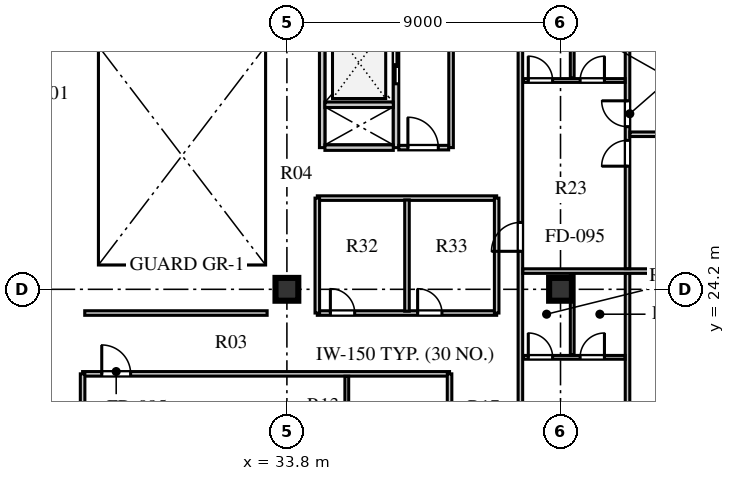
"""IFC4 building model, lengths in metres.
Left out: names, types, materials, properties, quantities, classifications, styles, units other than length and angle.
Written with IfcOpenShell. Run it as: python <this file> out.ifc"""

import sys

from ifc_helpers import new_model, si_unit, direction, frame, frame_2d, origin, origin_2d, place, context, subcontext, project, spatial, rectangle, extrude, element, fill, save


model = new_model("IFC4")
c1 = context("Model", 3, precision=1e-05, world=origin(), true_north=direction((0.0, 1.0)))
c2 = subcontext(c1, "Body", "Model", "MODEL_VIEW")
j1 = project(units=[si_unit("LENGTHUNIT", "METRE"), si_unit("PLANEANGLEUNIT", "RADIAN")], contexts=[c1])
p1 = place(None, origin())
s1 = spatial("IfcSite", under=j1, at=p1, CompositionType="ELEMENT")
p2 = place(p1, origin())
s2 = spatial("IfcBuilding", under=s1, at=p2, CompositionType="ELEMENT")
p3 = place(p2, frame((0.0, 0.0, 312.5)))
s3 = spatial("IfcBuildingStorey", under=s2, at=p3, CompositionType="ELEMENT", Elevation=312.5)
for number, where, z_axis, x_axis in (
    (1, (33.8, 24.2, 0.0), (0.0, 0.0, 1.0), (1.0, 0.0, 0.0)),
    (2, (42.8, 24.2, 0.0), (0.0, 0.0, 1.0), (1.0, 0.0, 0.0)),
):
    element("IfcColumn", number, at=place(p3, frame(where, z_axis=z_axis, x_axis=x_axis)), inside=s3, PredefinedType="COLUMN", context=c2, shape_type="SweptSolid", body=[
        extrude(rectangle(XDim=0.75, YDim=0.75, at=origin_2d()), origin(), (0.0, 0.0, 1.0), 3.56),
    ])
p4 = place(p3, frame((34.96, 28.86, 0.0), z_axis=(0.0, 0.0, 1.0), x_axis=(0.0, 1.0, 0.0)))
e3 = element("IfcWall", 3, at=p4, inside=s3, PredefinedType="SOLIDWALL", context=c2, shape_type="SweptSolid", body=[
    extrude(rectangle(XDim=4.22, YDim=0.18, at=frame_2d((2.11, 0.0))), origin(), (0.0, 0.0, 1.0), 3.56),
])
p5 = place(p3, frame((37.39, 28.86, 0.0), z_axis=(0.0, 0.0, 1.0), x_axis=(0.0, 1.0, 0.0)))
e4 = element("IfcWall", 4, at=p5, inside=s3, PredefinedType="SOLIDWALL", context=c2, shape_type="SweptSolid", body=[
    extrude(rectangle(XDim=4.22, YDim=0.18, at=frame_2d((2.11, 0.0))), origin(), (0.0, 0.0, 1.0), 3.56),
])
p6 = place(p5, frame((2.1, 0.0, 0.0)))
e5 = element("IfcOpeningElement", 5, at=p6, cuts=e4, PredefinedType="OPENING", context=c2, shape_type="SweptSolid", body=[
    extrude(rectangle(XDim=1.2, YDim=2.12, at=frame_2d((0.6, 1.06))), frame((0.0, 0.1, 0.0), z_axis=(0.0, -1.0, 0.0), x_axis=(1.0, 0.0, 0.0)), (0.0, 0.0, 1.0), 0.2),
])
for number, where, z_axis, x_axis in (
    (6, (35.05, 28.86, 0.0), (0.0, 0.0, 1.0), (1.0, 0.0, 0.0)),
    (7, (35.05, 30.27, 0.0), (0.0, 0.0, 1.0), (1.0, 0.0, 0.0)),
):
    element("IfcWall", number, at=place(p3, frame(where, z_axis=z_axis, x_axis=x_axis)), inside=s3, PredefinedType="SOLIDWALL", context=c2, shape_type="SweptSolid", body=[
        extrude(rectangle(XDim=2.25, YDim=0.18, at=frame_2d((1.125, 0.0))), origin(), (0.0, 0.0, 1.0), 3.56),
    ])
p7 = place(p3, frame((39.2, 28.86, 0.0), z_axis=(0.0, 0.0, 1.0), x_axis=(0.0, 1.0, 0.0)))
e8 = element("IfcWall", 8, at=p7, inside=s3, PredefinedType="PARTITIONING", context=c2, shape_type="SweptSolid", body=[
    extrude(rectangle(XDim=4.22, YDim=0.15, at=frame_2d((2.11, 0.0))), origin(), (0.0, 0.0, 1.0), 3.56),
])
p8 = place(p3, frame((37.48, 28.86, 0.0), z_axis=(0.0, 0.0, 1.0), x_axis=(1.0, 0.0, 0.0)))
e9 = element("IfcWall", 9, at=p8, inside=s3, PredefinedType="PARTITIONING", context=c2, shape_type="SweptSolid", body=[
    extrude(rectangle(XDim=1.64, YDim=0.15, at=frame_2d((0.82, 0.0))), origin(), (0.0, 0.0, 1.0), 3.56),
])
p9 = place(p8, frame((0.3, 0.0, 0.0)))
e10 = element("IfcOpeningElement", 10, at=p9, cuts=e9, PredefinedType="OPENING", context=c2, shape_type="SweptSolid", body=[
    extrude(rectangle(XDim=1.0, YDim=2.1, at=frame_2d((0.5, 1.05))), frame((0.0, 0.085, 0.0), z_axis=(0.0, -1.0, 0.0), x_axis=(1.0, 0.0, 0.0)), (0.0, 0.0, 1.0), 0.17),
])
p10 = place(p3, frame((27.08, 21.42, 0.0), z_axis=(0.0, 0.0, 1.0), x_axis=(1.0, 0.0, 0.0)))
e11 = element("IfcWall", 11, at=p10, inside=s3, PredefinedType="PARTITIONING", context=c2, shape_type="SweptSolid", body=[
    extrude(rectangle(XDim=12.07, YDim=0.15, at=frame_2d((6.035, 0.0))), origin(), (0.0, 0.0, 1.0), 3.26),
])
p11 = place(p10, frame((0.63, 0.0, 0.0)))
e12 = element("IfcOpeningElement", 12, at=p11, cuts=e11, PredefinedType="OPENING", context=c2, shape_type="SweptSolid", body=[
    extrude(rectangle(XDim=0.95, YDim=2.1, at=frame_2d((0.475, 1.05))), frame((0.0, 0.085, 0.0), z_axis=(0.0, -1.0, 0.0), x_axis=(1.0, 0.0, 0.0)), (0.0, 0.0, 1.0), 0.17),
])
p12 = place(p3, frame((27.08, 10.38, 0.0), z_axis=(0.0, 0.0, 1.0), x_axis=(0.0, 1.0, 0.0)))
e13 = element("IfcWall", 13, at=p12, inside=s3, PredefinedType="PARTITIONING", context=c2, shape_type="SweptSolid", body=[
    extrude(rectangle(XDim=11.04, YDim=0.15, at=frame_2d((5.52, 0.0))), origin(), (0.0, 0.0, 1.0), 3.56),
])
p13 = place(p3, frame((27.15, 23.42, 0.0), z_axis=(0.0, 0.0, 1.0), x_axis=(1.0, 0.0, 0.0)))
e14 = element("IfcWall", 14, at=p13, inside=s3, PredefinedType="PARTITIONING", context=c2, shape_type="SweptSolid", body=[
    extrude(rectangle(XDim=6.0, YDim=0.15, at=frame_2d((3.0, 0.0))), origin(), (0.0, 0.0, 1.0), 3.56),
])
p14 = place(p3, frame((39.15, 10.38, 0.0), z_axis=(0.0, 0.0, 1.0), x_axis=(0.0, 1.0, 0.0)))
e15 = element("IfcWall", 15, at=p14, inside=s3, PredefinedType="PARTITIONING", context=c2, shape_type="SweptSolid", body=[
    extrude(rectangle(XDim=11.04, YDim=0.15, at=frame_2d((5.52, 0.0))), origin(), (0.0, 0.0, 1.0), 3.56),
])
p15 = place(p3, frame((35.77, 15.721, 0.0), z_axis=(0.0, 0.0, 1.0), x_axis=(0.0, 1.0, 0.0)))
e16 = element("IfcWall", 16, at=p15, inside=s3, PredefinedType="PLUMBINGWALL", context=c2, shape_type="SweptSolid", body=[
    extrude(rectangle(XDim=5.619, YDim=0.125, at=frame_2d((2.81, 0.0))), origin(), (0.0, 0.0, 1.0), 3.56),
])
p16 = place(p15, frame((0.16, 0.0, 0.0)))
e17 = element("IfcOpeningElement", 17, at=p16, cuts=e16, PredefinedType="OPENING", context=c2, shape_type="SweptSolid", body=[
    extrude(rectangle(XDim=0.8, YDim=2.05, at=frame_2d((0.4, 1.025))), frame((0.0, 0.073, 0.0), z_axis=(0.0, -1.0, 0.0), x_axis=(1.0, 0.0, 0.0)), (0.0, 0.0, 1.0), 0.145),
])
p17 = place(p15, frame((2.977, 0.0, 0.0)))
e18 = element("IfcOpeningElement", 18, at=p17, cuts=e16, PredefinedType="OPENING", context=c2, shape_type="SweptSolid", body=[
    extrude(rectangle(XDim=0.85, YDim=2.08, at=frame_2d((0.425, 1.04))), frame((0.0, 0.073, 0.0), z_axis=(0.0, -1.0, 0.0), x_axis=(1.0, 0.0, 0.0)), (0.0, 0.0, 1.0), 0.145),
])
p18 = place(p3, frame((41.48, 15.35, 0.0), z_axis=(0.0, 0.0, 1.0), x_axis=(0.0, 1.0, 0.0)))
e19 = element("IfcWall", 19, at=p18, inside=s3, PredefinedType="PARTITIONING", context=c2, shape_type="SweptSolid", body=[
    extrude(rectangle(XDim=26.5, YDim=0.15, at=frame_2d((13.25, 0.0))), origin(), (0.0, 0.0, 1.0), 3.56),
])
p19 = place(p18, frame((0.75, 0.0, 0.0)))
e20 = element("IfcOpeningElement", 20, at=p19, cuts=e19, PredefinedType="OPENING", context=c2, shape_type="SweptSolid", body=[
    extrude(rectangle(XDim=0.95, YDim=2.1, at=frame_2d((0.475, 1.05))), frame((0.0, 0.085, 0.0), z_axis=(0.0, -1.0, 0.0), x_axis=(1.0, 0.0, 0.0)), (0.0, 0.0, 1.0), 0.17),
])
p20 = place(p18, frame((10.1, 0.0, 0.0)))
e21 = element("IfcOpeningElement", 21, at=p20, cuts=e19, PredefinedType="OPENING", context=c2, shape_type="SweptSolid", body=[
    extrude(rectangle(XDim=0.95, YDim=2.1, at=frame_2d((0.475, 1.05))), frame((0.0, 0.085, 0.0), z_axis=(0.0, -1.0, 0.0), x_axis=(1.0, 0.0, 0.0)), (0.0, 0.0, 1.0), 0.17),
])
p21 = place(p18, frame((19.1, 0.0, 0.0)))
e22 = element("IfcOpeningElement", 22, at=p21, cuts=e19, PredefinedType="OPENING", context=c2, shape_type="SweptSolid", body=[
    extrude(rectangle(XDim=0.95, YDim=2.1, at=frame_2d((0.475, 1.05))), frame((0.0, 0.085, 0.0), z_axis=(0.0, -1.0, 0.0), x_axis=(1.0, 0.0, 0.0)), (0.0, 0.0, 1.0), 0.17),
])
p22 = place(p3, frame((45.004, 15.53, 0.0), z_axis=(0.0, 0.0, 1.0), x_axis=(0.0, 1.0, 0.0)))
e23 = element("IfcWall", 23, at=p22, inside=s3, PredefinedType="PARTITIONING", context=c2, shape_type="SweptSolid", body=[
    extrude(rectangle(XDim=9.19, YDim=0.15, at=frame_2d((4.595, 0.0))), origin(), (0.0, 0.0, 1.0), 3.56),
])
p23 = place(p22, frame((0.4, 0.0, 0.0)))
e24 = element("IfcOpeningElement", 24, at=p23, cuts=e23, PredefinedType="OPENING", context=c2, shape_type="SweptSolid", body=[
    extrude(rectangle(XDim=0.9, YDim=2.08, at=frame_2d((0.45, 1.04))), frame((0.0, 0.085, 0.0), z_axis=(0.0, -1.0, 0.0), x_axis=(1.0, 0.0, 0.0)), (0.0, 0.0, 1.0), 0.17),
])
p24 = place(p3, frame((41.58, 21.963, 0.0), z_axis=(0.0, 0.0, 1.0), x_axis=(1.0, 0.0, 0.0)))
e25 = element("IfcWall", 25, at=p24, inside=s3, PredefinedType="PLUMBINGWALL", context=c2, shape_type="SweptSolid", body=[
    extrude(rectangle(XDim=3.344, YDim=0.125, at=frame_2d((1.672, 0.0))), origin(), (0.0, 0.0, 1.0), 3.56),
])
p25 = place(p24, frame((0.16, 0.0, 0.0)))
e26 = element("IfcOpeningElement", 26, at=p25, cuts=e25, PredefinedType="OPENING", context=c2, shape_type="SweptSolid", body=[
    extrude(rectangle(XDim=0.8, YDim=2.05, at=frame_2d((0.4, 1.025))), frame((0.0, 0.073, 0.0), z_axis=(0.0, -1.0, 0.0), x_axis=(1.0, 0.0, 0.0)), (0.0, 0.0, 1.0), 0.145),
])
p26 = place(p24, frame((1.865, 0.0, 0.0)))
e27 = element("IfcOpeningElement", 27, at=p26, cuts=e25, PredefinedType="OPENING", context=c2, shape_type="SweptSolid", body=[
    extrude(rectangle(XDim=0.8, YDim=2.05, at=frame_2d((0.4, 1.025))), frame((0.0, 0.073, 0.0), z_axis=(0.0, -1.0, 0.0), x_axis=(1.0, 0.0, 0.0)), (0.0, 0.0, 1.0), 0.145),
])
p27 = place(p3, frame((43.185, 22.043, 0.0), z_axis=(0.0, 0.0, 1.0), x_axis=(0.0, 1.0, 0.0)))
e28 = element("IfcWall", 28, at=p27, inside=s3, PredefinedType="PLUMBINGWALL", context=c2, shape_type="SweptSolid", body=[
    extrude(rectangle(XDim=2.677, YDim=0.125, at=frame_2d((1.338, 0.0))), origin(), (0.0, 0.0, 1.0), 3.56),
])
p28 = place(p3, frame((41.56, 24.8, 0.0), z_axis=(0.0, 0.0, 1.0), x_axis=(1.0, 0.0, 0.0)))
e29 = element("IfcWall", 29, at=p28, inside=s3, PredefinedType="PARTITIONING", context=c2, shape_type="SweptSolid", body=[
    extrude(rectangle(XDim=6.36, YDim=0.15, at=frame_2d((3.18, 0.0))), origin(), (0.0, 0.0, 1.0), 3.56),
])
p29 = place(p3, frame((45.004, 24.88, 0.0), z_axis=(0.0, 0.0, 1.0), x_axis=(0.0, 1.0, 0.0)))
e30 = element("IfcWall", 30, at=p29, inside=s3, PredefinedType="PARTITIONING", context=c2, shape_type="SweptSolid", body=[
    extrude(rectangle(XDim=8.84, YDim=0.15, at=frame_2d((4.42, 0.0))), origin(), (0.0, 0.0, 1.0), 3.56),
])
p30 = place(p29, frame((3.37, 0.0, 0.0)))
e31 = element("IfcOpeningElement", 31, at=p30, cuts=e30, PredefinedType="OPENING", context=c2, shape_type="SweptSolid", body=[
    extrude(rectangle(XDim=0.85, YDim=2.08, at=frame_2d((0.425, 1.04))), frame((0.0, 0.085, 0.0), z_axis=(0.0, -1.0, 0.0), x_axis=(1.0, 0.0, 0.0)), (0.0, 0.0, 1.0), 0.17),
])
p31 = place(p29, frame((4.67, 0.0, 0.0)))
e32 = element("IfcOpeningElement", 32, at=p31, cuts=e30, PredefinedType="OPENING", context=c2, shape_type="SweptSolid", body=[
    extrude(rectangle(XDim=0.85, YDim=2.08, at=frame_2d((0.425, 1.04))), frame((0.0, 0.085, 0.0), z_axis=(0.0, -1.0, 0.0), x_axis=(1.0, 0.0, 0.0)), (0.0, 0.0, 1.0), 0.17),
])
p32 = place(p3, frame((41.58, 31.068, 0.0), z_axis=(0.0, 0.0, 1.0), x_axis=(1.0, 0.0, 0.0)))
e33 = element("IfcWall", 33, at=p32, inside=s3, PredefinedType="PLUMBINGWALL", context=c2, shape_type="SweptSolid", body=[
    extrude(rectangle(XDim=3.344, YDim=0.125, at=frame_2d((1.672, 0.0))), origin(), (0.0, 0.0, 1.0), 3.56),
])
p33 = place(p32, frame((0.16, 0.0, 0.0)))
e34 = element("IfcOpeningElement", 34, at=p33, cuts=e33, PredefinedType="OPENING", context=c2, shape_type="SweptSolid", body=[
    extrude(rectangle(XDim=0.8, YDim=2.05, at=frame_2d((0.4, 1.025))), frame((0.0, 0.073, 0.0), z_axis=(0.0, -1.0, 0.0), x_axis=(1.0, 0.0, 0.0)), (0.0, 0.0, 1.0), 0.145),
])
p34 = place(p32, frame((1.865, 0.0, 0.0)))
e35 = element("IfcOpeningElement", 35, at=p34, cuts=e33, PredefinedType="OPENING", context=c2, shape_type="SweptSolid", body=[
    extrude(rectangle(XDim=0.8, YDim=2.05, at=frame_2d((0.4, 1.025))), frame((0.0, 0.073, 0.0), z_axis=(0.0, -1.0, 0.0), x_axis=(1.0, 0.0, 0.0)), (0.0, 0.0, 1.0), 0.145),
])
p35 = place(p3, frame((43.185, 31.148, 0.0), z_axis=(0.0, 0.0, 1.0), x_axis=(0.0, 1.0, 0.0)))
e36 = element("IfcWall", 36, at=p35, inside=s3, PredefinedType="PLUMBINGWALL", context=c2, shape_type="SweptSolid", body=[
    extrude(rectangle(XDim=2.572, YDim=0.125, at=frame_2d((1.286, 0.0))), origin(), (0.0, 0.0, 1.0), 3.56),
])
p36 = place(p3, frame((45.084, 29.3, 0.0), z_axis=(0.0, 0.0, 1.0), x_axis=(1.0, 0.0, 0.0)))
e37 = element("IfcWall", 37, at=p36, inside=s3, PredefinedType="PARTITIONING", context=c2, shape_type="SweptSolid", body=[
    extrude(rectangle(XDim=2.836, YDim=0.15, at=frame_2d((1.418, 0.0))), origin(), (0.0, 0.0, 1.0), 3.56),
])
p37 = place(p3, frame((34.8, 23.42, 0.0), z_axis=(0.0, 0.0, 1.0), x_axis=(1.0, 0.0, 0.0)))
e38 = element("IfcWall", 38, at=p37, inside=s3, PredefinedType="PARTITIONING", context=c2, shape_type="SweptSolid", body=[
    extrude(rectangle(XDim=5.9, YDim=0.15, at=frame_2d((2.95, 0.0))), origin(), (0.0, 0.0, 1.0), 3.56),
])
p38 = place(p37, frame((0.43, 0.0, 0.0)))
e39 = element("IfcOpeningElement", 39, at=p38, cuts=e38, PredefinedType="OPENING", context=c2, shape_type="SweptSolid", body=[
    extrude(rectangle(XDim=0.8, YDim=2.05, at=frame_2d((0.4, 1.025))), frame((0.0, 0.085, 0.0), z_axis=(0.0, -1.0, 0.0), x_axis=(1.0, 0.0, 0.0)), (0.0, 0.0, 1.0), 0.17),
])
p39 = place(p37, frame((3.3, 0.0, 0.0)))
e40 = element("IfcOpeningElement", 40, at=p39, cuts=e38, PredefinedType="OPENING", context=c2, shape_type="SweptSolid", body=[
    extrude(rectangle(XDim=0.8, YDim=2.05, at=frame_2d((0.4, 1.025))), frame((0.0, 0.085, 0.0), z_axis=(0.0, -1.0, 0.0), x_axis=(1.0, 0.0, 0.0)), (0.0, 0.0, 1.0), 0.17),
])
p40 = place(p3, frame((34.8, 27.2, 0.0), z_axis=(0.0, 0.0, 1.0), x_axis=(1.0, 0.0, 0.0)))
e41 = element("IfcWall", 41, at=p40, inside=s3, PredefinedType="PARTITIONING", context=c2, shape_type="SweptSolid", body=[
    extrude(rectangle(XDim=5.9, YDim=0.15, at=frame_2d((2.95, 0.0))), origin(), (0.0, 0.0, 1.0), 3.26),
])
for number, where, z_axis, x_axis in (
    (42, (34.8, 23.42, 0.0), (0.0, 0.0, 1.0), (0.0, 1.0, 0.0)),
    (43, (40.7, 23.42, 0.0), (0.0, 0.0, 1.0), (0.0, 1.0, 0.0)),
):
    element("IfcWall", number, at=place(p3, frame(where, z_axis=z_axis, x_axis=x_axis)), inside=s3, PredefinedType="PARTITIONING", context=c2, shape_type="SweptSolid", body=[
        extrude(rectangle(XDim=3.78, YDim=0.15, at=frame_2d((1.89, 0.0))), origin(), (0.0, 0.0, 1.0), 3.56),
    ])
p41 = place(p3, frame((37.75, 23.48, 0.0), z_axis=(0.0, 0.0, 1.0), x_axis=(0.0, 1.0, 0.0)))
e44 = element("IfcWall", 44, at=p41, inside=s3, PredefinedType="PARTITIONING", context=c2, shape_type="SweptSolid", body=[
    extrude(rectangle(XDim=3.66, YDim=0.15, at=frame_2d((1.83, 0.0))), origin(), (0.0, 0.0, 1.0), 3.56),
])
p42 = place(p6, frame((1.2, 0.0, 0.0), z_axis=(0.0, 0.0, 1.0), x_axis=(-1.0, 0.0, 0.0)))
e45 = element("IfcDoor", 45, at=p42, inside=s3, OperationType="DOUBLE_DOOR_SLIDING", PredefinedType="DOOR", context=c2, shape_type="SweptSolid", body=[
    extrude(rectangle(XDim=1.2, YDim=2.12, at=frame_2d((0.6, 1.06))), frame((0.0, 0.025, 0.0), z_axis=(0.0, -1.0, 0.0), x_axis=(1.0, 0.0, 0.0)), (0.0, 0.0, 1.0), 0.05),
])
fill(e5, e45)
p43 = place(p9, origin())
e46 = element("IfcDoor", 46, at=p43, inside=s3, OperationType="SINGLE_SWING_LEFT", PredefinedType="DOOR", context=c2, shape_type="SweptSolid", body=[
    extrude(rectangle(XDim=1.0, YDim=2.1, at=frame_2d((0.5, 1.05))), frame((0.0, 0.025, 0.0), z_axis=(0.0, -1.0, 0.0), x_axis=(1.0, 0.0, 0.0)), (0.0, 0.0, 1.0), 0.05),
])
fill(e10, e46)
p44 = place(p11, frame((0.95, 0.0, 0.0), z_axis=(0.0, 0.0, 1.0), x_axis=(-1.0, 0.0, 0.0)))
e47 = element("IfcDoor", 47, at=p44, inside=s3, OperationType="SINGLE_SWING_RIGHT", PredefinedType="DOOR", context=c2, shape_type="SweptSolid", body=[
    extrude(rectangle(XDim=0.95, YDim=2.1, at=frame_2d((0.475, 1.05))), frame((0.0, 0.025, 0.0), z_axis=(0.0, -1.0, 0.0), x_axis=(1.0, 0.0, 0.0)), (0.0, 0.0, 1.0), 0.05),
])
fill(e12, e47)
p45 = place(p25, origin())
e48 = element("IfcDoor", 48, at=p45, inside=s3, OperationType="SINGLE_SWING_LEFT", PredefinedType="DOOR", context=c2, shape_type="SweptSolid", body=[
    extrude(rectangle(XDim=0.8, YDim=2.05, at=frame_2d((0.4, 1.025))), frame((0.0, 0.025, 0.0), z_axis=(0.0, -1.0, 0.0), x_axis=(1.0, 0.0, 0.0)), (0.0, 0.0, 1.0), 0.05),
])
fill(e26, e48)
p46 = place(p26, origin())
e49 = element("IfcDoor", 49, at=p46, inside=s3, OperationType="SINGLE_SWING_RIGHT", PredefinedType="DOOR", context=c2, shape_type="SweptSolid", body=[
    extrude(rectangle(XDim=0.8, YDim=2.05, at=frame_2d((0.4, 1.025))), frame((0.0, 0.025, 0.0), z_axis=(0.0, -1.0, 0.0), x_axis=(1.0, 0.0, 0.0)), (0.0, 0.0, 1.0), 0.05),
])
fill(e27, e49)
p47 = place(p33, origin())
e50 = element("IfcDoor", 50, at=p47, inside=s3, OperationType="SINGLE_SWING_LEFT", PredefinedType="DOOR", context=c2, shape_type="SweptSolid", body=[
    extrude(rectangle(XDim=0.8, YDim=2.05, at=frame_2d((0.4, 1.025))), frame((0.0, 0.025, 0.0), z_axis=(0.0, -1.0, 0.0), x_axis=(1.0, 0.0, 0.0)), (0.0, 0.0, 1.0), 0.05),
])
fill(e34, e50)
p48 = place(p34, origin())
e51 = element("IfcDoor", 51, at=p48, inside=s3, OperationType="SINGLE_SWING_RIGHT", PredefinedType="DOOR", context=c2, shape_type="SweptSolid", body=[
    extrude(rectangle(XDim=0.8, YDim=2.05, at=frame_2d((0.4, 1.025))), frame((0.0, 0.025, 0.0), z_axis=(0.0, -1.0, 0.0), x_axis=(1.0, 0.0, 0.0)), (0.0, 0.0, 1.0), 0.05),
])
fill(e35, e51)
p49 = place(p30, origin())
e52 = element("IfcDoor", 52, at=p49, inside=s3, OperationType="SINGLE_SWING_LEFT", PredefinedType="DOOR", context=c2, shape_type="SweptSolid", body=[
    extrude(rectangle(XDim=0.85, YDim=2.08, at=frame_2d((0.425, 1.04))), frame((0.0, 0.025, 0.0), z_axis=(0.0, -1.0, 0.0), x_axis=(1.0, 0.0, 0.0)), (0.0, 0.0, 1.0), 0.05),
])
fill(e31, e52)
p50 = place(p31, origin())
e53 = element("IfcDoor", 53, at=p50, inside=s3, OperationType="SINGLE_SWING_RIGHT", PredefinedType="DOOR", context=c2, shape_type="SweptSolid", body=[
    extrude(rectangle(XDim=0.85, YDim=2.08, at=frame_2d((0.425, 1.04))), frame((0.0, 0.025, 0.0), z_axis=(0.0, -1.0, 0.0), x_axis=(1.0, 0.0, 0.0)), (0.0, 0.0, 1.0), 0.05),
])
fill(e32, e53)
p51 = place(p20, origin())
e54 = element("IfcDoor", 54, at=p51, inside=s3, OperationType="SINGLE_SWING_LEFT", PredefinedType="DOOR", context=c2, shape_type="SweptSolid", body=[
    extrude(rectangle(XDim=0.95, YDim=2.1, at=frame_2d((0.475, 1.05))), frame((0.0, 0.025, 0.0), z_axis=(0.0, -1.0, 0.0), x_axis=(1.0, 0.0, 0.0)), (0.0, 0.0, 1.0), 0.05),
])
fill(e21, e54)
p52 = place(p38, origin())
e55 = element("IfcDoor", 55, at=p52, inside=s3, OperationType="SINGLE_SWING_LEFT", PredefinedType="DOOR", context=c2, shape_type="SweptSolid", body=[
    extrude(rectangle(XDim=0.8, YDim=2.05, at=frame_2d((0.4, 1.025))), frame((0.0, 0.025, 0.0), z_axis=(0.0, -1.0, 0.0), x_axis=(1.0, 0.0, 0.0)), (0.0, 0.0, 1.0), 0.05),
])
fill(e39, e55)
p53 = place(p39, origin())
e56 = element("IfcDoor", 56, at=p53, inside=s3, OperationType="SINGLE_SWING_LEFT", PredefinedType="DOOR", context=c2, shape_type="SweptSolid", body=[
    extrude(rectangle(XDim=0.8, YDim=2.05, at=frame_2d((0.4, 1.025))), frame((0.0, 0.025, 0.0), z_axis=(0.0, -1.0, 0.0), x_axis=(1.0, 0.0, 0.0)), (0.0, 0.0, 1.0), 0.05),
])
fill(e40, e56)
save(model, sys.argv[1])
